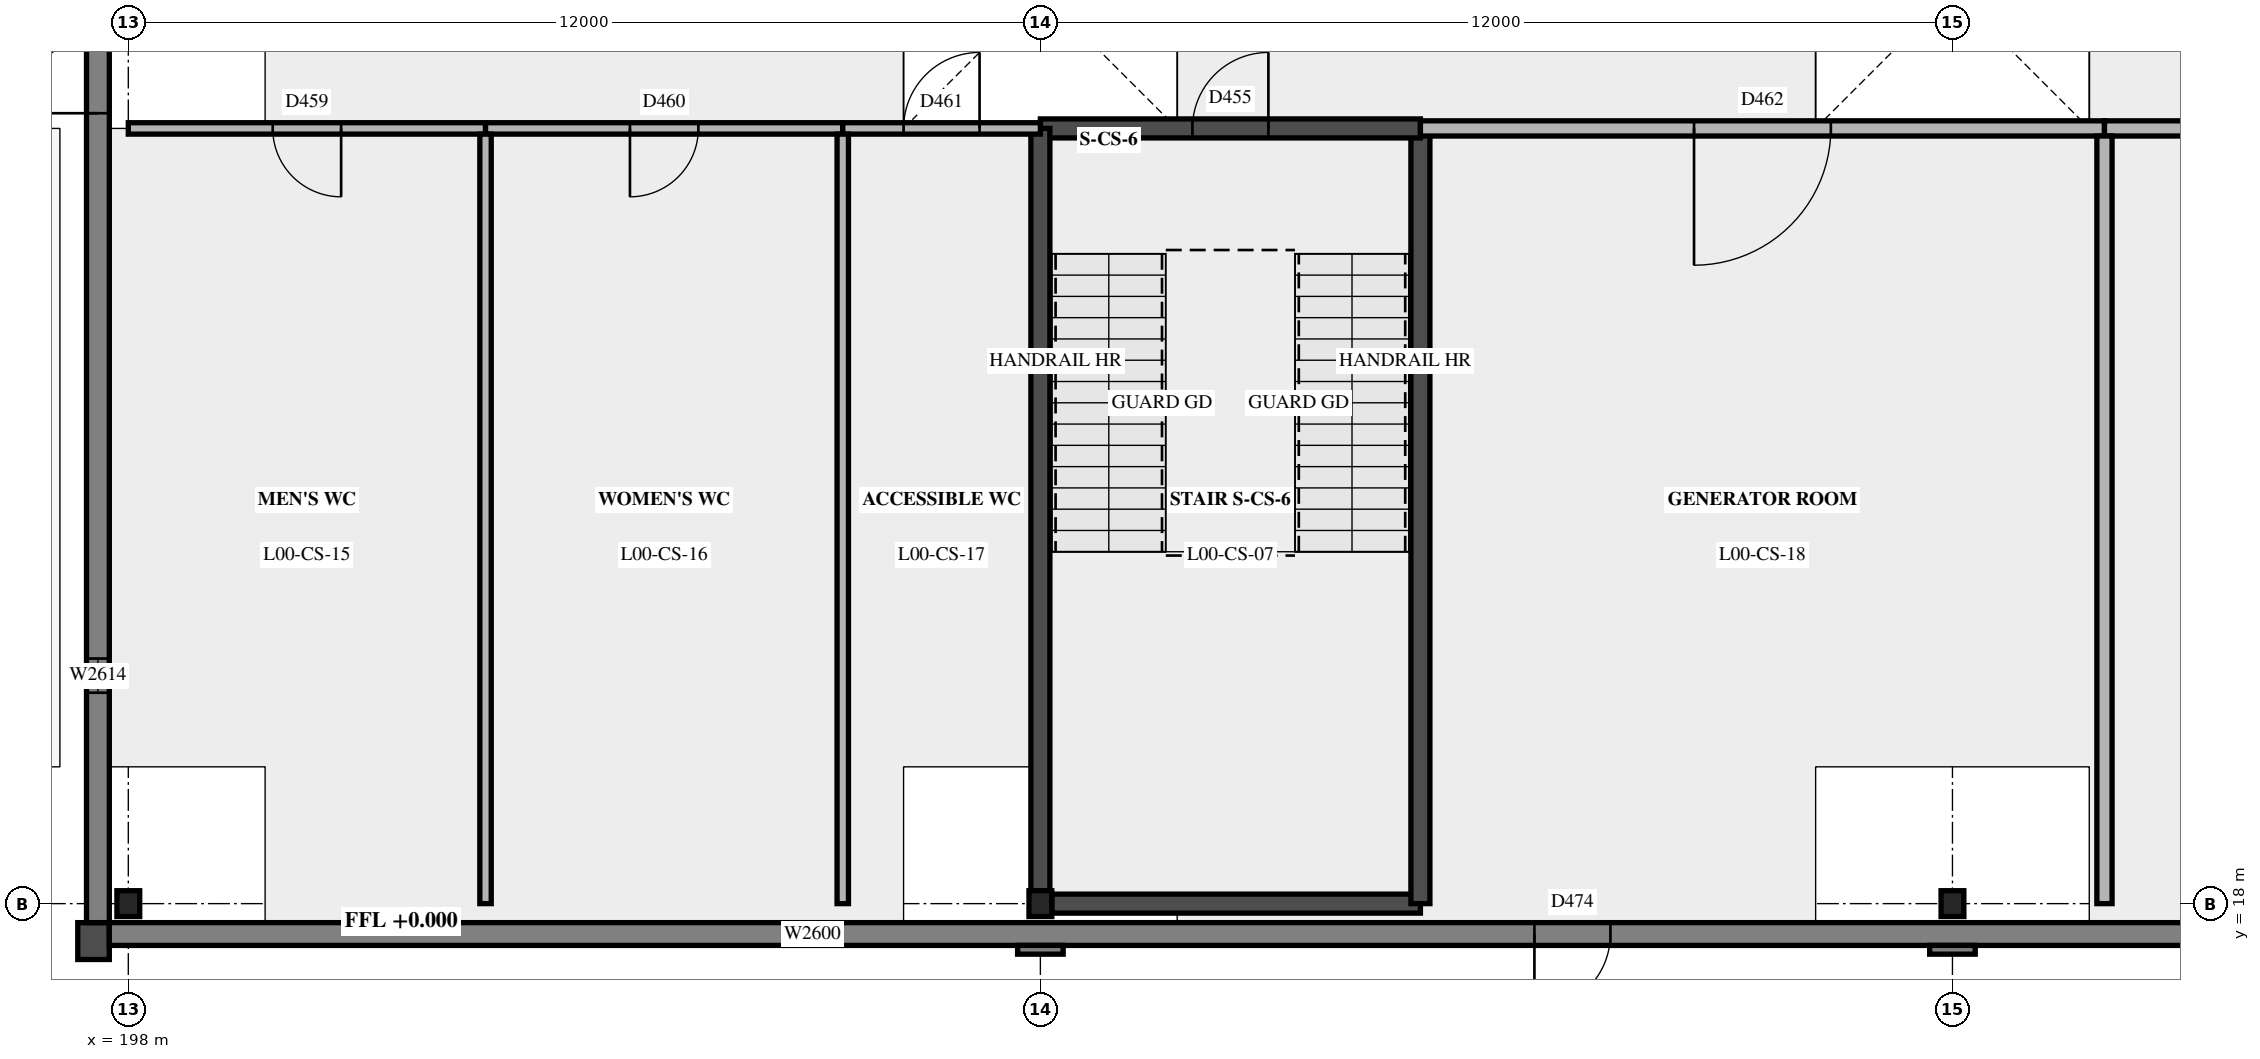
"""IFC4 building model, lengths in metres.
Left out: names, types, materials, properties, quantities, classifications, styles, units other than length and angle.
Written with IfcOpenShell. Run it as: python <this file> out.ifc"""

import sys

from ifc_helpers import new_model, si_unit, direction, frame, frame_2d, origin, origin_2d, place, context, subcontext, project, spatial, polyline, rectangle, i_section, outline, extrude, element, fill, save


model = new_model("IFC4")
c1 = context("Model", 3, precision=1e-05, world=origin(), true_north=direction((0.0, 1.0)))
c2 = subcontext(c1, "Body", "Model", "MODEL_VIEW")
j1 = project(units=[si_unit("LENGTHUNIT", "METRE"), si_unit("PLANEANGLEUNIT", "RADIAN")], contexts=[c1])
p1 = place(None, origin())
s1 = spatial("IfcSite", under=j1, at=p1, CompositionType="ELEMENT")
p2 = place(p1, origin())
s2 = spatial("IfcBuilding", under=s1, at=p2, CompositionType="ELEMENT")
p3 = place(p2, origin())
s3 = spatial("IfcBuildingStorey", under=s2, at=p3, CompositionType="ELEMENT", Elevation=0.0)
for number, where, z_axis, x_axis in (
    (1, (198.0, 18.0, 0.0), (0.0, 0.0, 1.0), (1.0, 0.0, 0.0)),
    (2, (210.0, 18.0, 0.0), (0.0, 0.0, 1.0), (1.0, 0.0, 0.0)),
    (3, (222.0, 18.0, 0.0), (0.0, 0.0, 1.0), (1.0, 0.0, 0.0)),
):
    element("IfcColumn", number, at=place(p3, frame(where, z_axis=z_axis, x_axis=x_axis)), inside=s3, PredefinedType="COLUMN", context=c2, shape_type="SweptSolid", body=[
        extrude(i_section(OverallWidth=0.3, OverallDepth=0.34, WebThickness=0.012, FlangeThickness=0.021, at=origin_2d()), origin(), (0.0, 0.0, 1.0), 5.4),
    ])
p4 = place(p3, frame((210.15, 18.0, 0.0), z_axis=(0.0, 0.0, 1.0), x_axis=(1.0, 0.0, 0.0)))
e4 = element("IfcWall", 4, at=p4, inside=s3, PredefinedType="SHEAR", context=c2, shape_type="SweptSolid", body=[
    extrude(rectangle(XDim=4.85, YDim=0.25, at=frame_2d((2.425, 0.0))), origin(), (0.0, 0.0, 1.0), 5.4),
])
p5 = place(p3, frame((215.0, 18.0, 0.0), z_axis=(0.0, 0.0, 1.0), x_axis=(0.0, 1.0, 0.0)))
e5 = element("IfcWall", 5, at=p5, inside=s3, PredefinedType="SHEAR", context=c2, shape_type="SweptSolid", body=[
    extrude(rectangle(XDim=10.2, YDim=0.25, at=frame_2d((5.1, 0.0))), origin(), (0.0, 0.0, 1.0), 5.4),
])
p6 = place(p3, frame((210.0, 28.2, 0.0), z_axis=(0.0, 0.0, 1.0), x_axis=(1.0, 0.0, 0.0)))
e6 = element("IfcWall", 6, at=p6, inside=s3, PredefinedType="SHEAR", context=c2, shape_type="SweptSolid", body=[
    extrude(rectangle(XDim=5.0, YDim=0.25, at=frame_2d((2.5, 0.0))), origin(), (0.0, 0.0, 1.0), 5.4),
])
p7 = place(p6, frame((2.0, 0.0, 0.0)))
e7 = element("IfcOpeningElement", 7, at=p7, cuts=e6, PredefinedType="OPENING", context=c2, shape_type="SweptSolid", body=[
    extrude(rectangle(XDim=1.0, YDim=2.1, at=frame_2d((0.5, 1.05))), frame((0.0, 0.135, 0.0), z_axis=(0.0, -1.0, 0.0), x_axis=(1.0, 0.0, 0.0)), (0.0, 0.0, 1.0), 0.27),
])
p8 = place(p3, frame((210.0, 18.17, 0.0), z_axis=(0.0, 0.0, 1.0), x_axis=(0.0, 1.0, 0.0)))
e8 = element("IfcWall", 8, at=p8, inside=s3, PredefinedType="SHEAR", context=c2, shape_type="SweptSolid", body=[
    extrude(rectangle(XDim=10.03, YDim=0.25, at=frame_2d((5.015, 0.0))), origin(), (0.0, 0.0, 1.0), 5.4),
])
p9 = place(p3, frame((197.75, 17.508, 0.0), z_axis=(0.0, 0.0, 1.0), x_axis=(-1.0, 0.0, 0.0)))
e9 = element("IfcWall", 9, at=p9, inside=s3, PredefinedType="SOLIDWALL", context=c2, shape_type="SweptSolid", body=[
    extrude(rectangle(XDim=0.415, YDim=0.485, at=frame_2d((0.208, 0.0))), origin(), (0.0, 0.0, 1.0), 5.01),
])
p10 = place(p3, frame((197.75, 17.6, 0.0), z_axis=(0.0, 0.0, 1.0), x_axis=(1.0, 0.0, 0.0)))
e10 = element("IfcWall", 10, at=p10, inside=s3, PredefinedType="SOLIDWALL", context=c2, shape_type="SweptSolid", body=[
    extrude(rectangle(XDim=84.5, YDim=0.3, at=frame_2d((42.25, 0.0))), origin(), (0.0, 0.0, 1.0), 5.4),
])
p11 = place(p10, frame((19.75, 0.0, 0.0), z_axis=(0.0, 0.0, 1.0), x_axis=(-1.0, 0.0, 0.0)))
e11 = element("IfcOpeningElement", 11, at=p11, cuts=e10, PredefinedType="OPENING", context=c2, shape_type="SweptSolid", body=[
    extrude(rectangle(XDim=1.0, YDim=2.1, at=frame_2d((0.5, 1.05))), frame((0.0, 0.16, 0.0), z_axis=(0.0, -1.0, 0.0), x_axis=(1.0, 0.0, 0.0)), (0.0, 0.0, 1.0), 0.32),
])
p12 = place(p10, frame((31.75, 0.0, 0.0), z_axis=(0.0, 0.0, 1.0), x_axis=(-1.0, 0.0, 0.0)))
e12 = element("IfcOpeningElement", 12, at=p12, cuts=e10, PredefinedType="OPENING", context=c2, shape_type="SweptSolid", body=[
    extrude(rectangle(XDim=1.0, YDim=2.1, at=frame_2d((0.5, 1.05))), frame((0.0, 0.16, 0.0), z_axis=(0.0, -1.0, 0.0), x_axis=(1.0, 0.0, 0.0)), (0.0, 0.0, 1.0), 0.32),
])
p13 = place(p10, frame((53.75, 0.0, 0.0), z_axis=(0.0, 0.0, 1.0), x_axis=(-1.0, 0.0, 0.0)))
e13 = element("IfcOpeningElement", 13, at=p13, cuts=e10, PredefinedType="OPENING", context=c2, shape_type="SweptSolid", body=[
    extrude(rectangle(XDim=1.0, YDim=2.1, at=frame_2d((0.5, 1.05))), frame((0.0, 0.16, 0.0), z_axis=(0.0, -1.0, 0.0), x_axis=(1.0, 0.0, 0.0)), (0.0, 0.0, 1.0), 0.32),
])
p14 = place(p10, frame((74.75, 0.0, 0.0), z_axis=(0.0, 0.0, 1.0), x_axis=(-1.0, 0.0, 0.0)))
e14 = element("IfcOpeningElement", 14, at=p14, cuts=e10, PredefinedType="OPENING", context=c2, shape_type="SweptSolid", body=[
    extrude(rectangle(XDim=1.0, YDim=2.1, at=frame_2d((0.5, 1.05))), frame((0.0, 0.16, 0.0), z_axis=(0.0, -1.0, 0.0), x_axis=(1.0, 0.0, 0.0)), (0.0, 0.0, 1.0), 0.32),
])
p15 = place(p10, frame((9.025, 0.0, 1.8)))
e15 = element("IfcOpeningElement", 15, at=p15, cuts=e10, PredefinedType="OPENING", context=c2, shape_type="SweptSolid", body=[
    extrude(rectangle(XDim=0.45, YDim=2.4, at=frame_2d((0.225, 1.2))), frame((0.0, 0.16, 0.0), z_axis=(0.0, -1.0, 0.0), x_axis=(1.0, 0.0, 0.0)), (0.0, 0.0, 1.0), 0.32),
])
p16 = place(p10, frame((33.025, 0.0, 1.8)))
e16 = element("IfcOpeningElement", 16, at=p16, cuts=e10, PredefinedType="OPENING", context=c2, shape_type="SweptSolid", body=[
    extrude(rectangle(XDim=0.45, YDim=2.4, at=frame_2d((0.225, 1.2))), frame((0.0, 0.16, 0.0), z_axis=(0.0, -1.0, 0.0), x_axis=(1.0, 0.0, 0.0)), (0.0, 0.0, 1.0), 0.32),
])
p17 = place(p10, frame((45.025, 0.0, 1.8)))
e17 = element("IfcOpeningElement", 17, at=p17, cuts=e10, PredefinedType="OPENING", context=c2, shape_type="SweptSolid", body=[
    extrude(rectangle(XDim=0.45, YDim=2.4, at=frame_2d((0.225, 1.2))), frame((0.0, 0.16, 0.0), z_axis=(0.0, -1.0, 0.0), x_axis=(1.0, 0.0, 0.0)), (0.0, 0.0, 1.0), 0.32),
])
p18 = place(p10, frame((57.025, 0.0, 1.8)))
e18 = element("IfcOpeningElement", 18, at=p18, cuts=e10, PredefinedType="OPENING", context=c2, shape_type="SweptSolid", body=[
    extrude(rectangle(XDim=0.45, YDim=2.4, at=frame_2d((0.225, 1.2))), frame((0.0, 0.16, 0.0), z_axis=(0.0, -1.0, 0.0), x_axis=(1.0, 0.0, 0.0)), (0.0, 0.0, 1.0), 0.32),
])
p19 = place(p10, frame((81.025, 0.0, 1.8)))
e19 = element("IfcOpeningElement", 19, at=p19, cuts=e10, PredefinedType="OPENING", context=c2, shape_type="SweptSolid", body=[
    extrude(rectangle(XDim=0.45, YDim=2.4, at=frame_2d((0.225, 1.2))), frame((0.0, 0.16, 0.0), z_axis=(0.0, -1.0, 0.0), x_axis=(1.0, 0.0, 0.0)), (0.0, 0.0, 1.0), 0.32),
])
for number, where, z_axis, x_axis in (
    (20, (209.7, 17.393, 0.0), (0.0, 0.0, 1.0), (1.0, 0.0, 0.0)),
    (21, (221.7, 17.393, 0.0), (0.0, 0.0, 1.0), (1.0, 0.0, 0.0)),
):
    element("IfcWall", number, at=place(p3, frame(where, z_axis=z_axis, x_axis=x_axis)), inside=s3, PredefinedType="SOLIDWALL", context=c2, shape_type="SweptSolid", body=[
        extrude(rectangle(XDim=0.6, YDim=0.115, at=frame_2d((0.3, 0.0))), origin(), (0.0, 0.0, 1.0), 5.4),
    ])
p20 = place(p3, frame((197.6, 66.25, 0.0), z_axis=(0.0, 0.0, 1.0), x_axis=(0.0, -1.0, 0.0)))
e22 = element("IfcWall", 22, at=p20, inside=s3, PredefinedType="SOLIDWALL", context=c2, shape_type="SweptSolid", body=[
    extrude(rectangle(XDim=48.5, YDim=0.3, at=frame_2d((24.25, 0.0))), origin(), (0.0, 0.0, 1.0), 5.4),
])
p21 = place(p20, frame((25.65, 0.0, 0.0), z_axis=(0.0, 0.0, 1.0), x_axis=(-1.0, 0.0, 0.0)))
e23 = element("IfcOpeningElement", 23, at=p21, cuts=e22, PredefinedType="OPENING", context=c2, shape_type="SweptSolid", body=[
    extrude(rectangle(XDim=1.0, YDim=2.1, at=frame_2d((0.5, 1.05))), frame((0.0, 0.16, 0.0), z_axis=(0.0, -1.0, 0.0), x_axis=(1.0, 0.0, 0.0)), (0.0, 0.0, 1.0), 0.32),
])
p22 = place(p20, frame((37.85, 0.0, 0.0), z_axis=(0.0, 0.0, 1.0), x_axis=(-1.0, 0.0, 0.0)))
e24 = element("IfcOpeningElement", 24, at=p22, cuts=e22, PredefinedType="OPENING", context=c2, shape_type="SweptSolid", body=[
    extrude(rectangle(XDim=1.0, YDim=2.1, at=frame_2d((0.5, 1.05))), frame((0.0, 0.16, 0.0), z_axis=(0.0, -1.0, 0.0), x_axis=(1.0, 0.0, 0.0)), (0.0, 0.0, 1.0), 0.32),
])
p23 = place(p20, frame((9.025, 0.0, 1.8)))
e25 = element("IfcOpeningElement", 25, at=p23, cuts=e22, PredefinedType="OPENING", context=c2, shape_type="SweptSolid", body=[
    extrude(rectangle(XDim=0.45, YDim=2.4, at=frame_2d((0.225, 1.2))), frame((0.0, 0.16, 0.0), z_axis=(0.0, -1.0, 0.0), x_axis=(1.0, 0.0, 0.0)), (0.0, 0.0, 1.0), 0.32),
])
p24 = place(p20, frame((33.025, 0.0, 1.8)))
e26 = element("IfcOpeningElement", 26, at=p24, cuts=e22, PredefinedType="OPENING", context=c2, shape_type="SweptSolid", body=[
    extrude(rectangle(XDim=0.45, YDim=2.4, at=frame_2d((0.225, 1.2))), frame((0.0, 0.16, 0.0), z_axis=(0.0, -1.0, 0.0), x_axis=(1.0, 0.0, 0.0)), (0.0, 0.0, 1.0), 0.32),
])
p25 = place(p20, frame((45.025, 0.0, 1.8)))
e27 = element("IfcOpeningElement", 27, at=p25, cuts=e22, PredefinedType="OPENING", context=c2, shape_type="SweptSolid", body=[
    extrude(rectangle(XDim=0.45, YDim=2.4, at=frame_2d((0.225, 1.2))), frame((0.0, 0.16, 0.0), z_axis=(0.0, -1.0, 0.0), x_axis=(1.0, 0.0, 0.0)), (0.0, 0.0, 1.0), 0.32),
])
p26 = place(p3, frame((198.0, 28.2, 0.0), z_axis=(0.0, 0.0, 1.0), x_axis=(1.0, 0.0, 0.0)))
e28 = element("IfcWall", 28, at=p26, inside=s3, PredefinedType="PARTITIONING", context=c2, shape_type="SweptSolid", body=[
    extrude(outline(polyline([(0.0, 0.0), (4.7, 0.0), (4.7, 5.15), (2.505, 5.15), (2.5, 4.63), (2.3, 4.63), (2.295, 5.15), (0.1, 5.15), (0.095, 4.68), (0.0, 4.68), (0.0, 0.0)])), frame((0.0, 0.075, 0.0), z_axis=(0.0, -1.0, 0.0), x_axis=(1.0, 0.0, 0.0)), (0.0, 0.0, 1.0), 0.15),
])
p27 = place(p26, frame((1.9, 0.0, 0.0)))
e29 = element("IfcOpeningElement", 29, at=p27, cuts=e28, PredefinedType="OPENING", context=c2, shape_type="SweptSolid", body=[
    extrude(rectangle(XDim=0.9, YDim=2.1, at=frame_2d((0.45, 1.05))), frame((0.0, 0.085, 0.0), z_axis=(0.0, -1.0, 0.0), x_axis=(1.0, 0.0, 0.0)), (0.0, 0.0, 1.0), 0.17),
])
p28 = place(p3, frame((202.7, 28.2, 0.0), z_axis=(0.0, 0.0, 1.0), x_axis=(1.0, 0.0, 0.0)))
e30 = element("IfcWall", 30, at=p28, inside=s3, PredefinedType="PARTITIONING", context=c2, shape_type="SweptSolid", body=[
    extrude(outline(polyline([(0.0, 0.0), (4.7, 0.0), (4.7, 5.15), (2.605, 5.15), (2.6, 4.63), (2.4, 4.63), (2.395, 5.15), (0.205, 5.15), (0.2, 4.63), (0.0, 4.63), (0.0, 0.0)])), frame((0.0, 0.075, 0.0), z_axis=(0.0, -1.0, 0.0), x_axis=(1.0, 0.0, 0.0)), (0.0, 0.0, 1.0), 0.15),
])
p29 = place(p28, frame((1.9, 0.0, 0.0)))
e31 = element("IfcOpeningElement", 31, at=p29, cuts=e30, PredefinedType="OPENING", context=c2, shape_type="SweptSolid", body=[
    extrude(rectangle(XDim=0.9, YDim=2.1, at=frame_2d((0.45, 1.05))), frame((0.0, 0.085, 0.0), z_axis=(0.0, -1.0, 0.0), x_axis=(1.0, 0.0, 0.0)), (0.0, 0.0, 1.0), 0.17),
])
p30 = place(p3, frame((207.4, 28.2, 0.0), z_axis=(0.0, 0.0, 1.0), x_axis=(1.0, 0.0, 0.0)))
e32 = element("IfcWall", 32, at=p30, inside=s3, PredefinedType="PARTITIONING", context=c2, shape_type="SweptSolid", body=[
    extrude(outline(polyline([(0.0, 0.0), (2.6, 0.0), (2.6, 5.15), (0.305, 5.15), (0.3, 4.63), (0.1, 4.63), (0.095, 5.15), (0.0, 5.15), (0.0, 0.0)])), frame((0.0, 0.075, 0.0), z_axis=(0.0, -1.0, 0.0), x_axis=(1.0, 0.0, 0.0)), (0.0, 0.0, 1.0), 0.15),
])
p31 = place(p30, frame((0.8, 0.0, 0.0)))
e33 = element("IfcOpeningElement", 33, at=p31, cuts=e32, PredefinedType="OPENING", context=c2, shape_type="SweptSolid", body=[
    extrude(rectangle(XDim=1.0, YDim=2.1, at=frame_2d((0.5, 1.05))), frame((0.0, 0.085, 0.0), z_axis=(0.0, -1.0, 0.0), x_axis=(1.0, 0.0, 0.0)), (0.0, 0.0, 1.0), 0.17),
])
p32 = place(p3, frame((215.0, 28.2, 0.0), z_axis=(0.0, 0.0, 1.0), x_axis=(1.0, 0.0, 0.0)))
e34 = element("IfcWall", 34, at=p32, inside=s3, PredefinedType="PARTITIONING", context=c2, shape_type="SweptSolid", body=[
    extrude(outline(polyline([(0.0, 0.0), (9.0, 0.0), (9.0, 5.15), (7.1, 5.15), (7.095, 4.68), (6.905, 4.68), (6.9, 5.15), (4.705, 5.15), (4.7, 4.63), (4.5, 4.63), (4.495, 5.15), (2.305, 5.15), (2.3, 4.63), (2.1, 4.63), (2.095, 5.15), (0.0, 5.15), (0.0, 0.0)])), frame((0.0, 0.1, 0.0), z_axis=(0.0, -1.0, 0.0), x_axis=(1.0, 0.0, 0.0)), (0.0, 0.0, 1.0), 0.2),
])
p33 = place(p32, frame((3.6, 0.0, 0.0)))
e35 = element("IfcOpeningElement", 35, at=p33, cuts=e34, PredefinedType="OPENING", context=c2, shape_type="SweptSolid", body=[
    extrude(rectangle(XDim=1.8, YDim=2.1, at=frame_2d((0.9, 1.05))), frame((0.0, 0.11, 0.0), z_axis=(0.0, -1.0, 0.0), x_axis=(1.0, 0.0, 0.0)), (0.0, 0.0, 1.0), 0.22),
])
p34 = place(p3, frame((224.0, 28.2, 0.0), z_axis=(0.0, 0.0, 1.0), x_axis=(1.0, 0.0, 0.0)))
e36 = element("IfcWall", 36, at=p34, inside=s3, PredefinedType="PARTITIONING", context=c2, shape_type="SweptSolid", body=[
    extrude(outline(polyline([(0.0, 0.0), (10.0, 0.0), (10.0, 5.15), (7.705, 5.15), (7.7, 4.63), (7.5, 4.63), (7.495, 5.15), (5.305, 5.15), (5.3, 4.63), (5.1, 4.63), (5.095, 5.15), (2.905, 5.15), (2.9, 4.63), (2.7, 4.63), (2.695, 5.15), (0.505, 5.15), (0.5, 4.63), (0.3, 4.63), (0.295, 5.15), (0.0, 5.15), (0.0, 0.0)])), frame((0.0, 0.1, 0.0), z_axis=(0.0, -1.0, 0.0), x_axis=(1.0, 0.0, 0.0)), (0.0, 0.0, 1.0), 0.2),
])
p35 = place(p34, frame((4.1, 0.0, 0.0)))
e37 = element("IfcOpeningElement", 37, at=p35, cuts=e36, PredefinedType="OPENING", context=c2, shape_type="SweptSolid", body=[
    extrude(rectangle(XDim=1.8, YDim=2.1, at=frame_2d((0.9, 1.05))), frame((0.0, 0.11, 0.0), z_axis=(0.0, -1.0, 0.0), x_axis=(1.0, 0.0, 0.0)), (0.0, 0.0, 1.0), 0.22),
])
p36 = place(p3, frame((202.7, 18.0, 0.0), z_axis=(0.0, 0.0, 1.0), x_axis=(0.0, 1.0, 0.0)))
e38 = element("IfcWall", 38, at=p36, inside=s3, PredefinedType="PARTITIONING", context=c2, shape_type="SweptSolid", body=[
    extrude(rectangle(XDim=10.125, YDim=0.15, at=frame_2d((5.062, 0.0))), origin(), (0.0, 0.0, 1.0), 4.63),
])
p37 = place(p3, frame((207.4, 18.0, 0.0), z_axis=(0.0, 0.0, 1.0), x_axis=(0.0, 1.0, 0.0)))
e39 = element("IfcWall", 39, at=p37, inside=s3, PredefinedType="PARTITIONING", context=c2, shape_type="SweptSolid", body=[
    extrude(outline(polyline([(0.0, 0.0), (10.125, 0.0), (10.125, 5.15), (0.105, 5.15), (0.1, 4.63), (0.0, 4.63), (0.0, 0.0)])), frame((0.0, 0.075, 0.0), z_axis=(0.0, -1.0, 0.0), x_axis=(1.0, 0.0, 0.0)), (0.0, 0.0, 1.0), 0.15),
])
p38 = place(p3, frame((224.0, 18.0, 0.0), z_axis=(0.0, 0.0, 1.0), x_axis=(0.0, 1.0, 0.0)))
e40 = element("IfcWall", 40, at=p38, inside=s3, PredefinedType="PARTITIONING", context=c2, shape_type="SweptSolid", body=[
    extrude(outline(polyline([(0.0, 0.0), (10.1, 0.0), (10.1, 5.15), (0.105, 5.15), (0.1, 4.63), (0.0, 4.63), (0.0, 0.0)])), frame((0.0, 0.1, 0.0), z_axis=(0.0, -1.0, 0.0), x_axis=(1.0, 0.0, 0.0)), (0.0, 0.0, 1.0), 0.2),
])
p39 = place(p11, origin())
e41 = element("IfcDoor", 41, at=p39, inside=s3, OperationType="SINGLE_SWING_RIGHT", PredefinedType="DOOR", context=c2, shape_type="SweptSolid", body=[
    extrude(rectangle(XDim=1.0, YDim=2.1, at=frame_2d((0.5, 1.05))), frame((0.0, 0.025, 0.0), z_axis=(0.0, -1.0, 0.0), x_axis=(1.0, 0.0, 0.0)), (0.0, 0.0, 1.0), 0.05),
])
fill(e11, e41)
p40 = place(p15, origin())
e42 = element("IfcWindow", 42, at=p40, inside=s3, PartitioningType="SINGLE_PANEL", PredefinedType="WINDOW", context=c2, shape_type="SweptSolid", body=[
    extrude(rectangle(XDim=0.45, YDim=2.4, at=frame_2d((0.225, 1.2))), frame((0.0, 0.03, 0.0), z_axis=(0.0, -1.0, 0.0), x_axis=(1.0, 0.0, 0.0)), (0.0, 0.0, 1.0), 0.06),
])
fill(e15, e42)
p41 = place(p22, origin())
e43 = element("IfcDoor", 43, at=p41, inside=s3, OperationType="SINGLE_SWING_LEFT", PredefinedType="DOOR", context=c2, shape_type="SweptSolid", body=[
    extrude(rectangle(XDim=1.0, YDim=2.1, at=frame_2d((0.5, 1.05))), frame((0.0, 0.025, 0.0), z_axis=(0.0, -1.0, 0.0), x_axis=(1.0, 0.0, 0.0)), (0.0, 0.0, 1.0), 0.05),
])
fill(e24, e43)
p42 = place(p25, origin())
e44 = element("IfcWindow", 44, at=p42, inside=s3, PartitioningType="SINGLE_PANEL", PredefinedType="WINDOW", context=c2, shape_type="SweptSolid", body=[
    extrude(rectangle(XDim=0.45, YDim=2.4, at=frame_2d((0.225, 1.2))), frame((0.0, 0.03, 0.0), z_axis=(0.0, -1.0, 0.0), x_axis=(1.0, 0.0, 0.0)), (0.0, 0.0, 1.0), 0.06),
])
fill(e27, e44)
p43 = place(p7, origin())
e45 = element("IfcDoor", 45, at=p43, inside=s3, OperationType="SINGLE_SWING_RIGHT", PredefinedType="DOOR", context=c2, shape_type="SweptSolid", body=[
    extrude(rectangle(XDim=1.0, YDim=2.1, at=frame_2d((0.5, 1.05))), frame((0.0, 0.025, 0.0), z_axis=(0.0, -1.0, 0.0), x_axis=(1.0, 0.0, 0.0)), (0.0, 0.0, 1.0), 0.05),
])
fill(e7, e45)
p44 = place(p27, origin())
e46 = element("IfcDoor", 46, at=p44, inside=s3, OperationType="SINGLE_SWING_LEFT", PredefinedType="DOOR", context=c2, shape_type="SweptSolid", body=[
    extrude(rectangle(XDim=0.9, YDim=2.1, at=frame_2d((0.45, 1.05))), frame((0.0, 0.025, 0.0), z_axis=(0.0, -1.0, 0.0), x_axis=(1.0, 0.0, 0.0)), (0.0, 0.0, 1.0), 0.05),
])
fill(e29, e46)
p45 = place(p29, origin())
e47 = element("IfcDoor", 47, at=p45, inside=s3, OperationType="SINGLE_SWING_RIGHT", PredefinedType="DOOR", context=c2, shape_type="SweptSolid", body=[
    extrude(rectangle(XDim=0.9, YDim=2.1, at=frame_2d((0.45, 1.05))), frame((0.0, 0.025, 0.0), z_axis=(0.0, -1.0, 0.0), x_axis=(1.0, 0.0, 0.0)), (0.0, 0.0, 1.0), 0.05),
])
fill(e31, e47)
p46 = place(p31, origin())
e48 = element("IfcDoor", 48, at=p46, inside=s3, OperationType="SINGLE_SWING_RIGHT", PredefinedType="DOOR", context=c2, shape_type="SweptSolid", body=[
    extrude(rectangle(XDim=1.0, YDim=2.1, at=frame_2d((0.5, 1.05))), frame((0.0, 0.025, 0.0), z_axis=(0.0, -1.0, 0.0), x_axis=(1.0, 0.0, 0.0)), (0.0, 0.0, 1.0), 0.05),
])
fill(e33, e48)
p47 = place(p33, origin())
e49 = element("IfcDoor", 49, at=p47, inside=s3, OperationType="DOUBLE_DOOR_SINGLE_SWING", PredefinedType="DOOR", context=c2, shape_type="SweptSolid", body=[
    extrude(rectangle(XDim=1.8, YDim=2.1, at=frame_2d((0.9, 1.05))), frame((0.0, 0.025, 0.0), z_axis=(0.0, -1.0, 0.0), x_axis=(1.0, 0.0, 0.0)), (0.0, 0.0, 1.0), 0.05),
])
fill(e35, e49)
save(model, sys.argv[1])
